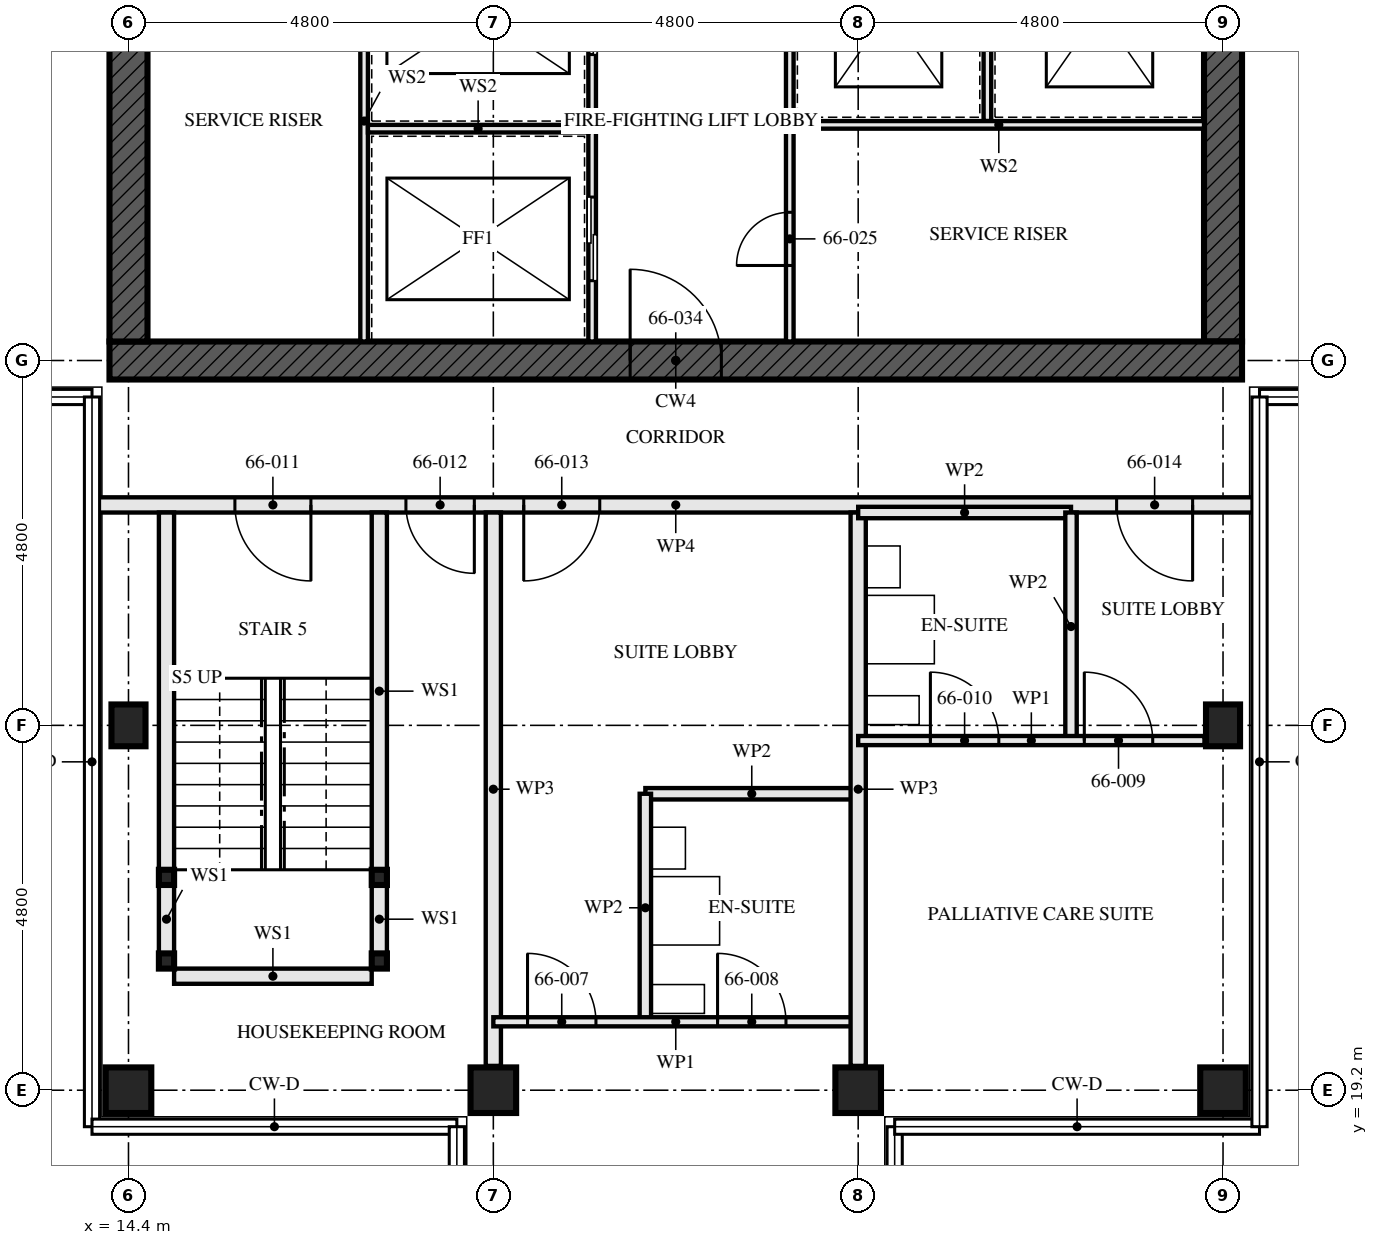
"""IFC4 building model, lengths in metres.
Left out: names, types, materials, properties, quantities, classifications, styles, units other than length and angle.
Written with IfcOpenShell. Run it as: python <this file> out.ifc"""

import sys

from ifc_helpers import new_model, si_unit, direction, frame, frame_2d, origin, origin_2d, place, context, subcontext, project, spatial, rectangle, hollow_rectangle, i_section, extrude, element, fill, save


model = new_model("IFC4")
c1 = context("Model", 3, precision=1e-05, world=origin(), true_north=direction((0.0, 1.0)))
c2 = subcontext(c1, "Body", "Model", "MODEL_VIEW")
j1 = project(units=[si_unit("LENGTHUNIT", "METRE"), si_unit("PLANEANGLEUNIT", "RADIAN")], contexts=[c1])
p1 = place(None, origin())
s1 = spatial("IfcSite", under=j1, at=p1, CompositionType="ELEMENT")
p2 = place(p1, origin())
s2 = spatial("IfcBuilding", under=s1, at=p2, CompositionType="ELEMENT")
p3 = place(p2, frame((0.0, 0.0, 240.0)))
s3 = spatial("IfcBuildingStorey", under=s2, at=p3, CompositionType="ELEMENT", Elevation=240.0)
p4 = place(p3, frame((14.4, 19.2, 0.0), z_axis=(0.0, 0.0, 1.0), x_axis=(0.0, 1.0, 0.0)))
e1 = element("IfcColumn", 1, at=p4, inside=s3, PredefinedType="COLUMN", context=c2, shape_type="SweptSolid", body=[
    extrude(hollow_rectangle(XDim=0.6, YDim=0.6, WallThickness=0.05, at=origin_2d()), origin(), (0.0, 0.0, 1.0), 3.5),
])
p5 = place(p3, frame((14.4, 24.0, 0.0), z_axis=(0.0, 0.0, 1.0), x_axis=(1.0, 0.0, 0.0)))
e2 = element("IfcColumn", 2, at=p5, inside=s3, PredefinedType="COLUMN", context=c2, shape_type="SweptSolid", body=[
    extrude(i_section(OverallWidth=0.448, OverallDepth=0.55, WebThickness=0.072, FlangeThickness=0.115, FilletRadius=0.015, at=origin_2d()), origin(), (0.0, 0.0, 1.0), 3.5),
])
for number, where, z_axis, x_axis in (
    (3, (19.2, 19.2, 0.0), (0.0, 0.0, 1.0), (0.0, 1.0, 0.0)),
    (4, (24.0, 19.2, 0.0), (0.0, 0.0, 1.0), (0.0, 1.0, 0.0)),
    (5, (28.8, 19.2, 0.0), (0.0, 0.0, 1.0), (0.0, 1.0, 0.0)),
):
    element("IfcColumn", number, at=place(p3, frame(where, z_axis=z_axis, x_axis=x_axis)), inside=s3, PredefinedType="COLUMN", context=c2, shape_type="SweptSolid", body=[
        extrude(hollow_rectangle(XDim=0.6, YDim=0.6, WallThickness=0.05, at=origin_2d()), origin(), (0.0, 0.0, 1.0), 3.5),
    ])
p6 = place(p3, frame((28.8, 24.0, 0.0), z_axis=(0.0, 0.0, 1.0), x_axis=(1.0, 0.0, 0.0)))
e6 = element("IfcColumn", 6, at=p6, inside=s3, PredefinedType="COLUMN", context=c2, shape_type="SweptSolid", body=[
    extrude(i_section(OverallWidth=0.448, OverallDepth=0.55, WebThickness=0.072, FlangeThickness=0.115, FilletRadius=0.015, at=origin_2d()), origin(), (0.0, 0.0, 1.0), 3.5),
])
p7 = place(p3, frame((14.15, 28.8, -0.17), z_axis=(0.0, 0.0, 1.0), x_axis=(1.0, 0.0, 0.0)))
e7 = element("IfcWall", 7, at=p7, inside=s3, PredefinedType="SHEAR", context=c2, shape_type="SweptSolid", body=[
    extrude(rectangle(XDim=14.9, YDim=0.5, at=frame_2d((7.45, 0.0))), origin(), (0.0, 0.0, 1.0), 3.42),
])
p8 = place(p7, frame((6.85, 0.0, 0.17)))
e8 = element("IfcOpeningElement", 8, at=p8, cuts=e7, PredefinedType="OPENING", context=c2, shape_type="SweptSolid", body=[
    extrude(rectangle(XDim=1.2, YDim=2.1, at=frame_2d((0.6, 1.05))), frame((0.0, 0.26, 0.0), z_axis=(0.0, -1.0, 0.0), x_axis=(1.0, 0.0, 0.0)), (0.0, 0.0, 1.0), 0.521),
])
p9 = place(p3, frame((14.4, 42.95, -0.17), z_axis=(0.0, 0.0, 1.0), x_axis=(0.0, -1.0, 0.0)))
e9 = element("IfcWall", 9, at=p9, inside=s3, PredefinedType="SHEAR", context=c2, shape_type="SweptSolid", body=[
    extrude(rectangle(XDim=13.9, YDim=0.5, at=frame_2d((6.95, 0.0))), origin(), (0.0, 0.0, 1.0), 3.42),
])
p10 = place(p9, frame((6.35, 0.0, 0.17)))
e10 = element("IfcOpeningElement", 10, at=p10, cuts=e9, PredefinedType="OPENING", context=c2, shape_type="SweptSolid", body=[
    extrude(rectangle(XDim=1.2, YDim=2.1, at=frame_2d((0.6, 1.05))), frame((0.0, 0.26, 0.0), z_axis=(0.0, -1.0, 0.0), x_axis=(1.0, 0.0, 0.0)), (0.0, 0.0, 1.0), 0.521),
])
p11 = place(p3, frame((28.8, 29.05, -0.17), z_axis=(0.0, 0.0, 1.0), x_axis=(0.0, 1.0, 0.0)))
e11 = element("IfcWall", 11, at=p11, inside=s3, PredefinedType="SHEAR", context=c2, shape_type="SweptSolid", body=[
    extrude(rectangle(XDim=13.9, YDim=0.5, at=frame_2d((6.95, 0.0))), origin(), (0.0, 0.0, 1.0), 3.42),
])
p12 = place(p11, frame((6.35, 0.0, 0.17)))
e12 = element("IfcOpeningElement", 12, at=p12, cuts=e11, PredefinedType="OPENING", context=c2, shape_type="SweptSolid", body=[
    extrude(rectangle(XDim=1.2, YDim=2.1, at=frame_2d((0.6, 1.05))), frame((0.0, 0.26, 0.0), z_axis=(0.0, -1.0, 0.0), x_axis=(1.0, 0.0, 0.0)), (0.0, 0.0, 1.0), 0.521),
])
for number, where, z_axis, x_axis in (
    (13, (14.9, 20.9, 0.0), (0.0, 0.0, 1.0), (1.0, 0.0, 0.0)),
    (14, (17.7, 20.9, 0.0), (0.0, 0.0, 1.0), (1.0, 0.0, 0.0)),
    (15, (14.9, 22.0, 0.0), (0.0, 0.0, 1.0), (1.0, 0.0, 0.0)),
    (16, (17.7, 22.0, 0.0), (0.0, 0.0, 1.0), (1.0, 0.0, 0.0)),
):
    element("IfcColumn", number, at=place(p3, frame(where, z_axis=z_axis, x_axis=x_axis)), inside=s3, PredefinedType="COLUMN", context=c2, shape_type="SweptSolid", body=[
        extrude(hollow_rectangle(XDim=0.2, YDim=0.2, WallThickness=0.008, at=origin_2d()), origin(), (0.0, 0.0, 1.0), 3.25),
    ])
p13 = place(p3, frame((14.9, 21.0, 0.0), z_axis=(0.0, 0.0, 1.0), x_axis=(0.0, 1.0, 0.0)))
e17 = element("IfcWall", 17, at=p13, inside=s3, PredefinedType="SOLIDWALL", context=c2, shape_type="SweptSolid", body=[
    extrude(rectangle(XDim=0.9, YDim=0.2, at=frame_2d((0.45, 0.0))), origin(), (0.0, 0.0, 1.0), 2.94),
])
p14 = place(p3, frame((14.9, 22.1, 0.0), z_axis=(0.0, 0.0, 1.0), x_axis=(0.0, 1.0, 0.0)))
e18 = element("IfcWall", 18, at=p14, inside=s3, PredefinedType="SOLIDWALL", context=c2, shape_type="SweptSolid", body=[
    extrude(rectangle(XDim=4.7, YDim=0.2, at=frame_2d((2.35, 0.0))), origin(), (0.0, 0.0, 1.0), 2.94),
])
p15 = place(p3, frame((17.7, 21.0, 0.0), z_axis=(0.0, 0.0, 1.0), x_axis=(0.0, 1.0, 0.0)))
e19 = element("IfcWall", 19, at=p15, inside=s3, PredefinedType="SOLIDWALL", context=c2, shape_type="SweptSolid", body=[
    extrude(rectangle(XDim=0.9, YDim=0.2, at=frame_2d((0.45, 0.0))), origin(), (0.0, 0.0, 1.0), 2.94),
])
p16 = place(p3, frame((17.7, 22.1, 0.0), z_axis=(0.0, 0.0, 1.0), x_axis=(0.0, 1.0, 0.0)))
e20 = element("IfcWall", 20, at=p16, inside=s3, PredefinedType="SOLIDWALL", context=c2, shape_type="SweptSolid", body=[
    extrude(rectangle(XDim=4.7, YDim=0.2, at=frame_2d((2.35, 0.0))), origin(), (0.0, 0.0, 1.0), 2.94),
])
p17 = place(p3, frame((15.0, 20.7, 0.0), z_axis=(0.0, 0.0, 1.0), x_axis=(1.0, 0.0, 0.0)))
e21 = element("IfcWall", 21, at=p17, inside=s3, PredefinedType="SOLIDWALL", context=c2, shape_type="SweptSolid", body=[
    extrude(rectangle(XDim=2.6, YDim=0.2, at=frame_2d((1.3, 0.0))), origin(), (0.0, 0.0, 1.0), 3.25),
])
p18 = place(p3, frame((19.2, 19.52, 0.0), z_axis=(0.0, 0.0, 1.0), x_axis=(0.0, 1.0, 0.0)))
e22 = element("IfcWall", 22, at=p18, inside=s3, PredefinedType="PARTITIONING", context=c2, shape_type="SweptSolid", body=[
    extrude(rectangle(XDim=7.28, YDim=0.2, at=frame_2d((3.64, 0.0))), origin(), (0.0, 0.0, 1.0), 2.04),
])
p19 = place(p3, frame((21.2, 20.1, 0.0), z_axis=(0.0, 0.0, 1.0), x_axis=(0.0, 1.0, 0.0)))
e23 = element("IfcWall", 23, at=p19, inside=s3, PredefinedType="PARTITIONING", context=c2, shape_type="SweptSolid", body=[
    extrude(rectangle(XDim=3.0, YDim=0.15, at=frame_2d((1.5, 0.0))), origin(), (0.0, 0.0, 1.0), 3.25),
])
p20 = place(p3, frame((21.2, 23.1, 0.0), z_axis=(0.0, 0.0, 1.0), x_axis=(1.0, 0.0, 0.0)))
e24 = element("IfcWall", 24, at=p20, inside=s3, PredefinedType="PARTITIONING", context=c2, shape_type="SweptSolid", body=[
    extrude(rectangle(XDim=2.8, YDim=0.15, at=frame_2d((1.4, 0.0))), origin(), (0.0, 0.0, 1.0), 3.25),
])
p21 = place(p3, frame((19.2, 20.1, 0.0), z_axis=(0.0, 0.0, 1.0), x_axis=(1.0, 0.0, 0.0)))
e25 = element("IfcWall", 25, at=p21, inside=s3, PredefinedType="PARTITIONING", context=c2, shape_type="SweptSolid", body=[
    extrude(rectangle(XDim=4.8, YDim=0.12, at=frame_2d((2.4, 0.0))), origin(), (0.0, 0.0, 1.0), 3.25),
])
p22 = place(p21, frame((0.45, 0.0, 0.0)))
e26 = element("IfcOpeningElement", 26, at=p22, cuts=e25, PredefinedType="OPENING", context=c2, shape_type="SweptSolid", body=[
    extrude(rectangle(XDim=0.9, YDim=2.1, at=frame_2d((0.45, 1.05))), frame((0.0, 0.071, 0.0), z_axis=(0.0, -1.0, 0.0), x_axis=(1.0, 0.0, 0.0)), (0.0, 0.0, 1.0), 0.141),
])
p23 = place(p21, frame((2.95, 0.0, 0.0)))
e27 = element("IfcOpeningElement", 27, at=p23, cuts=e25, PredefinedType="OPENING", context=c2, shape_type="SweptSolid", body=[
    extrude(rectangle(XDim=0.9, YDim=2.1, at=frame_2d((0.45, 1.05))), frame((0.0, 0.071, 0.0), z_axis=(0.0, -1.0, 0.0), x_axis=(1.0, 0.0, 0.0)), (0.0, 0.0, 1.0), 0.141),
])
p24 = place(p3, frame((24.0, 19.52, 0.0), z_axis=(0.0, 0.0, 1.0), x_axis=(0.0, 1.0, 0.0)))
e28 = element("IfcWall", 28, at=p24, inside=s3, PredefinedType="PARTITIONING", context=c2, shape_type="SweptSolid", body=[
    extrude(rectangle(XDim=7.28, YDim=0.2, at=frame_2d((3.64, 0.0))), origin(), (0.0, 0.0, 1.0), 2.04),
])
p25 = place(p3, frame((26.8, 23.8, 0.0), z_axis=(0.0, 0.0, 1.0), x_axis=(0.0, 1.0, 0.0)))
e29 = element("IfcWall", 29, at=p25, inside=s3, PredefinedType="PARTITIONING", context=c2, shape_type="SweptSolid", body=[
    extrude(rectangle(XDim=3.0, YDim=0.15, at=frame_2d((1.5, 0.0))), origin(), (0.0, 0.0, 1.0), 2.04),
])
p26 = place(p3, frame((24.0, 26.8, 0.0), z_axis=(0.0, 0.0, 1.0), x_axis=(1.0, 0.0, 0.0)))
e30 = element("IfcWall", 30, at=p26, inside=s3, PredefinedType="PARTITIONING", context=c2, shape_type="SweptSolid", body=[
    extrude(rectangle(XDim=2.8, YDim=0.15, at=frame_2d((1.4, 0.0))), origin(), (0.0, 0.0, 1.0), 3.25),
])
p27 = place(p3, frame((24.0, 23.8, 0.0), z_axis=(0.0, 0.0, 1.0), x_axis=(1.0, 0.0, 0.0)))
e31 = element("IfcWall", 31, at=p27, inside=s3, PredefinedType="PARTITIONING", context=c2, shape_type="SweptSolid", body=[
    extrude(rectangle(XDim=4.556, YDim=0.12, at=frame_2d((2.278, 0.0))), origin(), (0.0, 0.0, 1.0), 2.04),
])
p28 = place(p27, frame((2.975, 0.0, 0.0)))
e32 = element("IfcOpeningElement", 32, at=p28, cuts=e31, PredefinedType="OPENING", context=c2, shape_type="SweptSolid", body=[
    extrude(rectangle(XDim=0.9, YDim=2.0, at=frame_2d((0.45, 1.0))), frame((0.0, 0.071, 0.0), z_axis=(0.0, -1.0, 0.0), x_axis=(1.0, 0.0, 0.0)), (0.0, 0.0, 1.0), 0.141),
])
p29 = place(p27, frame((0.95, 0.0, 0.0)))
e33 = element("IfcOpeningElement", 33, at=p29, cuts=e31, PredefinedType="OPENING", context=c2, shape_type="SweptSolid", body=[
    extrude(rectangle(XDim=0.9, YDim=2.0, at=frame_2d((0.45, 1.0))), frame((0.0, 0.071, 0.0), z_axis=(0.0, -1.0, 0.0), x_axis=(1.0, 0.0, 0.0)), (0.0, 0.0, 1.0), 0.141),
])
p30 = place(p3, frame((13.945, 26.9, 0.0), z_axis=(0.0, 0.0, 1.0), x_axis=(1.0, 0.0, 0.0)))
e34 = element("IfcWall", 34, at=p30, inside=s3, PredefinedType="PARTITIONING", context=c2, shape_type="SweptSolid", body=[
    extrude(rectangle(XDim=15.31, YDim=0.2, at=frame_2d((7.655, 0.0))), origin(), (0.0, 0.0, 1.0), 2.04),
])
p31 = place(p30, frame((1.855, 0.0, 0.0)))
e35 = element("IfcOpeningElement", 35, at=p31, cuts=e34, PredefinedType="OPENING", context=c2, shape_type="SweptSolid", body=[
    extrude(rectangle(XDim=1.0, YDim=2.0, at=frame_2d((0.5, 1.0))), frame((0.0, 0.111, 0.0), z_axis=(0.0, -1.0, 0.0), x_axis=(1.0, 0.0, 0.0)), (0.0, 0.0, 1.0), 0.221),
])
p32 = place(p30, frame((4.105, 0.0, 0.0)))
e36 = element("IfcOpeningElement", 36, at=p32, cuts=e34, PredefinedType="OPENING", context=c2, shape_type="SweptSolid", body=[
    extrude(rectangle(XDim=0.9, YDim=2.0, at=frame_2d((0.45, 1.0))), frame((0.0, 0.111, 0.0), z_axis=(0.0, -1.0, 0.0), x_axis=(1.0, 0.0, 0.0)), (0.0, 0.0, 1.0), 0.221),
])
p33 = place(p30, frame((5.655, 0.0, 0.0)))
e37 = element("IfcOpeningElement", 37, at=p33, cuts=e34, PredefinedType="OPENING", context=c2, shape_type="SweptSolid", body=[
    extrude(rectangle(XDim=1.0, YDim=2.0, at=frame_2d((0.5, 1.0))), frame((0.0, 0.111, 0.0), z_axis=(0.0, -1.0, 0.0), x_axis=(1.0, 0.0, 0.0)), (0.0, 0.0, 1.0), 0.221),
])
p34 = place(p30, frame((13.455, 0.0, 0.0)))
e38 = element("IfcOpeningElement", 38, at=p34, cuts=e34, PredefinedType="OPENING", context=c2, shape_type="SweptSolid", body=[
    extrude(rectangle(XDim=1.0, YDim=2.0, at=frame_2d((0.5, 1.0))), frame((0.0, 0.111, 0.0), z_axis=(0.0, -1.0, 0.0), x_axis=(1.0, 0.0, 0.0)), (0.0, 0.0, 1.0), 0.221),
])
p35 = place(p3, frame((20.5, 29.05, 0.0), z_axis=(0.0, 0.0, 1.0), x_axis=(0.0, 1.0, 0.0)))
e39 = element("IfcWall", 39, at=p35, inside=s3, PredefinedType="SOLIDWALL", context=c2, shape_type="SweptSolid", body=[
    extrude(rectangle(XDim=5.8, YDim=0.1, at=frame_2d((2.9, 0.0))), origin(), (0.0, 0.0, 1.0), 3.25),
])
p36 = place(p35, frame((0.8, 0.0, 0.0)))
e40 = element("IfcOpeningElement", 40, at=p36, cuts=e39, PredefinedType="OPENING", context=c2, shape_type="SweptSolid", body=[
    extrude(rectangle(XDim=1.1, YDim=2.3, at=frame_2d((0.55, 1.15))), frame((0.0, 0.061, 0.0), z_axis=(0.0, -1.0, 0.0), x_axis=(1.0, 0.0, 0.0)), (0.0, 0.0, 1.0), 0.121),
])
p37 = place(p35, frame((3.775, 0.0, 0.0)))
e41 = element("IfcOpeningElement", 41, at=p37, cuts=e39, PredefinedType="OPENING", context=c2, shape_type="SweptSolid", body=[
    extrude(rectangle(XDim=1.1, YDim=2.3, at=frame_2d((0.55, 1.15))), frame((0.0, 0.061, 0.0), z_axis=(0.0, -1.0, 0.0), x_axis=(1.0, 0.0, 0.0)), (0.0, 0.0, 1.0), 0.121),
])
p38 = place(p3, frame((23.1, 29.05, 0.0), z_axis=(0.0, 0.0, 1.0), x_axis=(0.0, 1.0, 0.0)))
e42 = element("IfcWall", 42, at=p38, inside=s3, PredefinedType="SOLIDWALL", context=c2, shape_type="SweptSolid", body=[
    extrude(rectangle(XDim=5.8, YDim=0.1, at=frame_2d((2.9, 0.0))), origin(), (0.0, 0.0, 1.0), 3.25),
])
p39 = place(p38, frame((1.0, 0.0, 0.0)))
e43 = element("IfcOpeningElement", 43, at=p39, cuts=e42, PredefinedType="OPENING", context=c2, shape_type="SweptSolid", body=[
    extrude(rectangle(XDim=0.7, YDim=2.1, at=frame_2d((0.35, 1.05))), frame((0.0, 0.061, 0.0), z_axis=(0.0, -1.0, 0.0), x_axis=(1.0, 0.0, 0.0)), (0.0, 0.0, 1.0), 0.121),
])
p40 = place(p3, frame((17.5, 29.05, 0.0), z_axis=(0.0, 0.0, 1.0), x_axis=(0.0, 1.0, 0.0)))
e44 = element("IfcWall", 44, at=p40, inside=s3, PredefinedType="SOLIDWALL", context=c2, shape_type="SweptSolid", body=[
    extrude(rectangle(XDim=5.8, YDim=0.1, at=frame_2d((2.9, 0.0))), origin(), (0.0, 0.0, 1.0), 3.25),
])
p41 = place(p3, frame((17.55, 31.85, 0.0), z_axis=(0.0, 0.0, 1.0), x_axis=(1.0, 0.0, 0.0)))
e45 = element("IfcWall", 45, at=p41, inside=s3, PredefinedType="SOLIDWALL", context=c2, shape_type="SweptSolid", body=[
    extrude(rectangle(XDim=2.9, YDim=0.1, at=frame_2d((1.45, 0.0))), origin(), (0.0, 0.0, 1.0), 3.25),
])
p42 = place(p3, frame((25.7, 31.95, 0.0), z_axis=(0.0, 0.0, 1.0), x_axis=(0.0, 1.0, 0.0)))
e46 = element("IfcWall", 46, at=p42, inside=s3, PredefinedType="SOLIDWALL", context=c2, shape_type="SweptSolid", body=[
    extrude(rectangle(XDim=2.9, YDim=0.1, at=frame_2d((1.45, 0.0))), origin(), (0.0, 0.0, 1.0), 3.25),
])
p43 = place(p3, frame((23.15, 31.9, 0.0), z_axis=(0.0, 0.0, 1.0), x_axis=(1.0, 0.0, 0.0)))
e47 = element("IfcWall", 47, at=p43, inside=s3, PredefinedType="SOLIDWALL", context=c2, shape_type="SweptSolid", body=[
    extrude(rectangle(XDim=5.4, YDim=0.1, at=frame_2d((2.7, 0.0))), origin(), (0.0, 0.0, 1.0), 3.25),
])
p44 = place(p22, origin())
e48 = element("IfcDoor", 48, at=p44, inside=s3, OperationType="SINGLE_SWING_RIGHT", PredefinedType="DOOR", context=c2, shape_type="SweptSolid", body=[
    extrude(rectangle(XDim=0.9, YDim=2.1, at=frame_2d((0.45, 1.05))), frame((0.0, 0.022, 0.0), z_axis=(0.0, -1.0, 0.0), x_axis=(1.0, 0.0, 0.0)), (0.0, 0.0, 1.0), 0.044),
])
fill(e26, e48)
p45 = place(p23, origin())
e49 = element("IfcDoor", 49, at=p45, inside=s3, OperationType="SINGLE_SWING_RIGHT", PredefinedType="DOOR", context=c2, shape_type="SweptSolid", body=[
    extrude(rectangle(XDim=0.9, YDim=2.1, at=frame_2d((0.45, 1.05))), frame((0.0, 0.022, 0.0), z_axis=(0.0, -1.0, 0.0), x_axis=(1.0, 0.0, 0.0)), (0.0, 0.0, 1.0), 0.044),
])
fill(e27, e49)
p46 = place(p28, origin())
e50 = element("IfcDoor", 50, at=p46, inside=s3, OperationType="SINGLE_SWING_RIGHT", PredefinedType="DOOR", context=c2, shape_type="SweptSolid", body=[
    extrude(rectangle(XDim=0.9, YDim=2.0, at=frame_2d((0.45, 1.0))), frame((0.0, 0.022, 0.0), z_axis=(0.0, -1.0, 0.0), x_axis=(1.0, 0.0, 0.0)), (0.0, 0.0, 1.0), 0.044),
])
fill(e32, e50)
p47 = place(p29, origin())
e51 = element("IfcDoor", 51, at=p47, inside=s3, OperationType="SINGLE_SWING_RIGHT", PredefinedType="DOOR", context=c2, shape_type="SweptSolid", body=[
    extrude(rectangle(XDim=0.9, YDim=2.0, at=frame_2d((0.45, 1.0))), frame((0.0, 0.022, 0.0), z_axis=(0.0, -1.0, 0.0), x_axis=(1.0, 0.0, 0.0)), (0.0, 0.0, 1.0), 0.044),
])
fill(e33, e51)
p48 = place(p31, frame((1.0, 0.0, 0.0), z_axis=(0.0, 0.0, 1.0), x_axis=(-1.0, 0.0, 0.0)))
e52 = element("IfcDoor", 52, at=p48, inside=s3, OperationType="SINGLE_SWING_RIGHT", PredefinedType="DOOR", context=c2, shape_type="SweptSolid", body=[
    extrude(rectangle(XDim=1.0, YDim=2.0, at=frame_2d((0.5, 1.0))), frame((0.0, 0.032, 0.0), z_axis=(0.0, -1.0, 0.0), x_axis=(1.0, 0.0, 0.0)), (0.0, 0.0, 1.0), 0.064),
])
fill(e35, e52)
p49 = place(p32, frame((0.9, 0.0, 0.0), z_axis=(0.0, 0.0, 1.0), x_axis=(-1.0, 0.0, 0.0)))
e53 = element("IfcDoor", 53, at=p49, inside=s3, OperationType="SINGLE_SWING_RIGHT", PredefinedType="DOOR", context=c2, shape_type="SweptSolid", body=[
    extrude(rectangle(XDim=0.9, YDim=2.0, at=frame_2d((0.45, 1.0))), frame((0.0, 0.027, 0.0), z_axis=(0.0, -1.0, 0.0), x_axis=(1.0, 0.0, 0.0)), (0.0, 0.0, 1.0), 0.054),
])
fill(e36, e53)
p50 = place(p33, frame((1.0, 0.0, 0.0), z_axis=(0.0, 0.0, 1.0), x_axis=(-1.0, 0.0, 0.0)))
e54 = element("IfcDoor", 54, at=p50, inside=s3, OperationType="SINGLE_SWING_LEFT", PredefinedType="DOOR", context=c2, shape_type="SweptSolid", body=[
    extrude(rectangle(XDim=1.0, YDim=2.0, at=frame_2d((0.5, 1.0))), frame((0.0, 0.027, 0.0), z_axis=(0.0, -1.0, 0.0), x_axis=(1.0, 0.0, 0.0)), (0.0, 0.0, 1.0), 0.054),
])
fill(e37, e54)
p51 = place(p34, frame((1.0, 0.0, 0.0), z_axis=(0.0, 0.0, 1.0), x_axis=(-1.0, 0.0, 0.0)))
e55 = element("IfcDoor", 55, at=p51, inside=s3, OperationType="SINGLE_SWING_RIGHT", PredefinedType="DOOR", context=c2, shape_type="SweptSolid", body=[
    extrude(rectangle(XDim=1.0, YDim=2.0, at=frame_2d((0.5, 1.0))), frame((0.0, 0.027, 0.0), z_axis=(0.0, -1.0, 0.0), x_axis=(1.0, 0.0, 0.0)), (0.0, 0.0, 1.0), 0.054),
])
fill(e38, e55)
p52 = place(p36, origin())
e56 = element("IfcDoor", 56, at=p52, inside=s3, OperationType="SLIDING_TO_LEFT", PredefinedType="DOOR", context=c2, shape_type="SweptSolid", body=[
    extrude(rectangle(XDim=1.1, YDim=2.3, at=frame_2d((0.55, 1.15))), frame((0.0, 0.05, 0.0), z_axis=(0.0, -1.0, 0.0), x_axis=(1.0, 0.0, 0.0)), (0.0, 0.0, 1.0), 0.1),
])
fill(e40, e56)
p53 = place(p37, origin())
e57 = element("IfcDoor", 57, at=p53, inside=s3, OperationType="SLIDING_TO_LEFT", PredefinedType="DOOR", context=c2, shape_type="SweptSolid", body=[
    extrude(rectangle(XDim=1.1, YDim=2.3, at=frame_2d((0.55, 1.15))), frame((0.0, 0.05, 0.0), z_axis=(0.0, -1.0, 0.0), x_axis=(1.0, 0.0, 0.0)), (0.0, 0.0, 1.0), 0.1),
])
fill(e41, e57)
p54 = place(p39, origin())
e58 = element("IfcDoor", 58, at=p54, inside=s3, OperationType="SINGLE_SWING_RIGHT", PredefinedType="DOOR", context=c2, shape_type="SweptSolid", body=[
    extrude(rectangle(XDim=0.7, YDim=2.1, at=frame_2d((0.35, 1.05))), frame((0.0, 0.027, 0.0), z_axis=(0.0, -1.0, 0.0), x_axis=(1.0, 0.0, 0.0)), (0.0, 0.0, 1.0), 0.054),
])
fill(e43, e58)
p55 = place(p8, origin())
e59 = element("IfcDoor", 59, at=p55, inside=s3, OperationType="SINGLE_SWING_LEFT", PredefinedType="DOOR", context=c2, shape_type="SweptSolid", body=[
    extrude(rectangle(XDim=1.2, YDim=2.1, at=frame_2d((0.6, 1.05))), frame((0.0, 0.027, 0.0), z_axis=(0.0, -1.0, 0.0), x_axis=(1.0, 0.0, 0.0)), (0.0, 0.0, 1.0), 0.054),
])
fill(e8, e59)
save(model, sys.argv[1])
